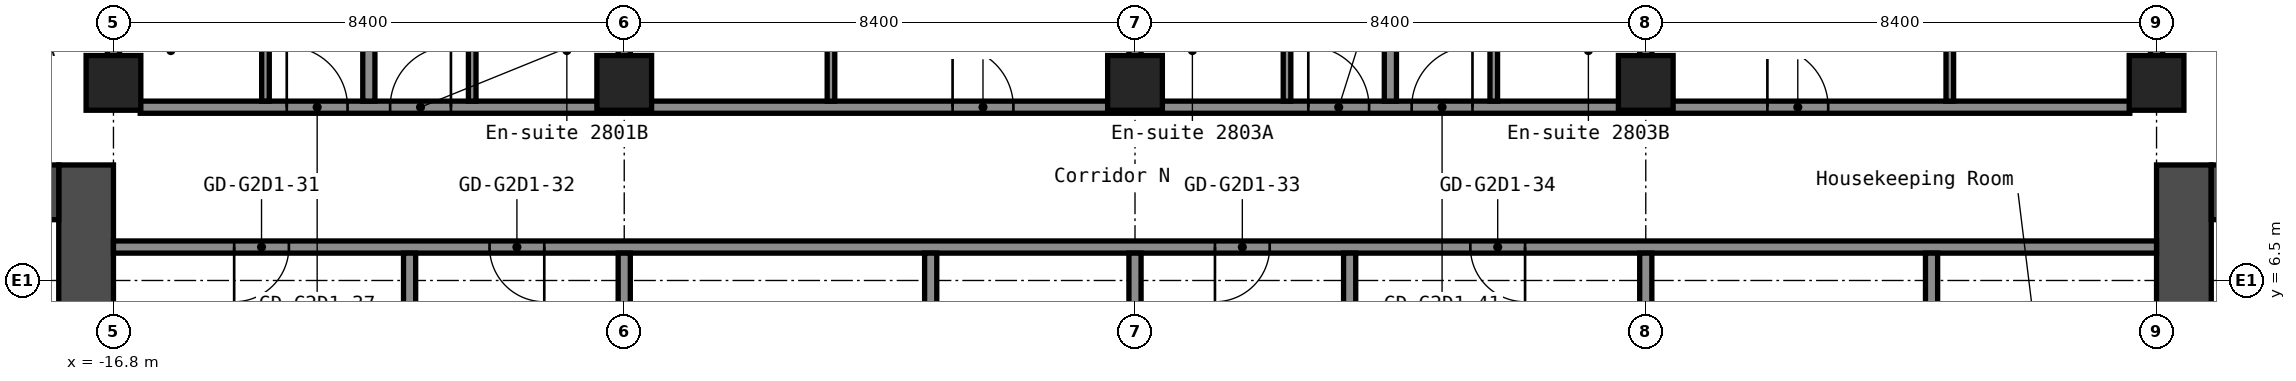
"""IFC4 building model, lengths in metres.
Left out: names, types, materials, properties, quantities, classifications, styles, units other than length and angle.
Written with IfcOpenShell. Run it as: python <this file> out.ifc"""

import sys

from ifc_helpers import new_model, si_unit, direction, frame, frame_2d, origin, origin_2d, place, context, subcontext, project, spatial, rectangle, hollow_rectangle, extrude, element, fill, save


model = new_model("IFC4")
c1 = context("Model", 3, precision=1e-05, world=origin(), true_north=direction((0.0, 1.0)))
c2 = subcontext(c1, "Body", "Model", "MODEL_VIEW")
j1 = project(units=[si_unit("LENGTHUNIT", "METRE"), si_unit("PLANEANGLEUNIT", "RADIAN")], contexts=[c1])
p1 = place(None, origin())
s1 = spatial("IfcSite", under=j1, at=p1, CompositionType="ELEMENT")
p2 = place(p1, origin())
s2 = spatial("IfcBuilding", under=s1, at=p2, CompositionType="ELEMENT")
p3 = place(p2, frame((0.0, 0.0, 101.0)))
s3 = spatial("IfcBuildingStorey", under=s2, at=p3, CompositionType="ELEMENT", Elevation=101.0)
for number, where, z_axis, x_axis in (
    (1, (-16.8, 9.75, 0.0), (0.0, 0.0, 1.0), (1.0, 0.0, 0.0)),
    (2, (-8.4, 9.75, 0.0), (0.0, 0.0, 1.0), (1.0, 0.0, 0.0)),
    (3, (0.0, 9.75, 0.0), (0.0, 0.0, 1.0), (1.0, 0.0, 0.0)),
    (4, (8.4, 9.75, 0.0), (0.0, 0.0, 1.0), (1.0, 0.0, 0.0)),
    (5, (16.8, 9.75, 0.0), (0.0, 0.0, 1.0), (1.0, 0.0, 0.0)),
):
    element("IfcColumn", number, at=place(p3, frame(where, z_axis=z_axis, x_axis=x_axis)), inside=s3, PredefinedType="COLUMN", context=c2, shape_type="SweptSolid", body=[
        extrude(hollow_rectangle(XDim=0.9, YDim=0.9, WallThickness=0.036, at=origin_2d()), origin(), (0.0, 0.0, 1.0), 2.8),
    ])
p4 = place(p3, frame((-17.25, -8.4, 0.0), z_axis=(0.0, 0.0, 1.0), x_axis=(0.0, 1.0, 0.0)))
e6 = element("IfcWall", 6, at=p4, inside=s3, PredefinedType="SHEAR", context=c2, shape_type="SweptSolid", body=[
    extrude(rectangle(XDim=16.8, YDim=0.9, at=frame_2d((8.4, 0.0))), origin(), (0.0, 0.0, 1.0), 2.8),
])
p5 = place(p4, frame((7.6, 0.0, 0.0)))
e7 = element("IfcOpeningElement", 7, at=p5, cuts=e6, PredefinedType="OPENING", context=c2, shape_type="SweptSolid", body=[
    extrude(rectangle(XDim=1.2, YDim=2.1, at=frame_2d((0.6, 1.05))), frame((0.0, 0.46, 0.0), z_axis=(0.0, -1.0, 0.0), x_axis=(1.0, 0.0, 0.0)), (0.0, 0.0, 1.0), 0.92),
])
p6 = place(p3, frame((-32.7, 7.95, 0.0), z_axis=(0.0, 0.0, 1.0), x_axis=(1.0, 0.0, 0.0)))
e8 = element("IfcWall", 8, at=p6, inside=s3, PredefinedType="SHEAR", context=c2, shape_type="SweptSolid", body=[
    extrude(rectangle(XDim=15.0, YDim=0.9, at=frame_2d((7.5, 0.0))), origin(), (0.0, 0.0, 1.0), 2.8),
])
p7 = place(p6, frame((3.4, 0.0, 0.0)))
e9 = element("IfcOpeningElement", 9, at=p7, cuts=e8, PredefinedType="OPENING", context=c2, shape_type="SweptSolid", body=[
    extrude(rectangle(XDim=1.2, YDim=2.1, at=frame_2d((0.6, 1.05))), frame((0.0, 0.46, 0.0), z_axis=(0.0, -1.0, 0.0), x_axis=(1.0, 0.0, 0.0)), (0.0, 0.0, 1.0), 0.92),
])
p8 = place(p6, frame((0.75, 0.0, 0.0)))
e10 = element("IfcOpeningElement", 10, at=p8, cuts=e8, PredefinedType="OPENING", context=c2, shape_type="SweptSolid", body=[
    extrude(rectangle(XDim=0.9, YDim=2.1, at=frame_2d((0.45, 1.05))), frame((0.0, 0.46, 0.0), z_axis=(0.0, -1.0, 0.0), x_axis=(1.0, 0.0, 0.0)), (0.0, 0.0, 1.0), 0.92),
])
p9 = place(p3, frame((17.25, -8.4, 0.0), z_axis=(0.0, 0.0, 1.0), x_axis=(0.0, 1.0, 0.0)))
e11 = element("IfcWall", 11, at=p9, inside=s3, PredefinedType="SHEAR", context=c2, shape_type="SweptSolid", body=[
    extrude(rectangle(XDim=16.8, YDim=0.9, at=frame_2d((8.4, 0.0))), origin(), (0.0, 0.0, 1.0), 2.8),
])
p10 = place(p9, frame((7.6, 0.0, 0.0)))
e12 = element("IfcOpeningElement", 12, at=p10, cuts=e11, PredefinedType="OPENING", context=c2, shape_type="SweptSolid", body=[
    extrude(rectangle(XDim=1.2, YDim=2.1, at=frame_2d((0.6, 1.05))), frame((0.0, 0.46, 0.0), z_axis=(0.0, -1.0, 0.0), x_axis=(1.0, 0.0, 0.0)), (0.0, 0.0, 1.0), 0.92),
])
p11 = place(p3, frame((17.7, 7.95, 0.0), z_axis=(0.0, 0.0, 1.0), x_axis=(1.0, 0.0, 0.0)))
e13 = element("IfcWall", 13, at=p11, inside=s3, PredefinedType="SHEAR", context=c2, shape_type="SweptSolid", body=[
    extrude(rectangle(XDim=15.0, YDim=0.9, at=frame_2d((7.5, 0.0))), origin(), (0.0, 0.0, 1.0), 2.8),
])
p12 = place(p11, frame((10.4, 0.0, 0.0)))
e14 = element("IfcOpeningElement", 14, at=p12, cuts=e13, PredefinedType="OPENING", context=c2, shape_type="SweptSolid", body=[
    extrude(rectangle(XDim=1.2, YDim=2.1, at=frame_2d((0.6, 1.05))), frame((0.0, 0.46, 0.0), z_axis=(0.0, -1.0, 0.0), x_axis=(1.0, 0.0, 0.0)), (0.0, 0.0, 1.0), 0.92),
])
p13 = place(p11, frame((13.35, 0.0, 0.0)))
e15 = element("IfcOpeningElement", 15, at=p13, cuts=e13, PredefinedType="OPENING", context=c2, shape_type="SweptSolid", body=[
    extrude(rectangle(XDim=0.9, YDim=2.1, at=frame_2d((0.45, 1.05))), frame((0.0, 0.46, 0.0), z_axis=(0.0, -1.0, 0.0), x_axis=(1.0, 0.0, 0.0)), (0.0, 0.0, 1.0), 0.92),
])
p14 = place(p3, frame((-16.8, 7.05, 0.0), z_axis=(0.0, 0.0, 1.0), x_axis=(1.0, 0.0, 0.0)))
e16 = element("IfcWall", 16, at=p14, inside=s3, PredefinedType="PARTITIONING", context=c2, shape_type="SweptSolid", body=[
    extrude(rectangle(XDim=33.6, YDim=0.2, at=frame_2d((16.8, 0.0))), origin(), (0.0, 0.0, 1.0), 2.8),
])
p15 = place(p14, frame((1.985, 0.0, 0.0)))
e17 = element("IfcOpeningElement", 17, at=p15, cuts=e16, PredefinedType="OPENING", context=c2, shape_type="SweptSolid", body=[
    extrude(rectangle(XDim=0.9, YDim=2.1, at=frame_2d((0.45, 1.05))), frame((0.0, 0.11, 0.0), z_axis=(0.0, -1.0, 0.0), x_axis=(1.0, 0.0, 0.0)), (0.0, 0.0, 1.0), 0.22),
])
p16 = place(p14, frame((6.185, 0.0, 0.0)))
e18 = element("IfcOpeningElement", 18, at=p16, cuts=e16, PredefinedType="OPENING", context=c2, shape_type="SweptSolid", body=[
    extrude(rectangle(XDim=0.9, YDim=2.1, at=frame_2d((0.45, 1.05))), frame((0.0, 0.11, 0.0), z_axis=(0.0, -1.0, 0.0), x_axis=(1.0, 0.0, 0.0)), (0.0, 0.0, 1.0), 0.22),
])
p17 = place(p14, frame((18.115, 0.0, 0.0)))
e19 = element("IfcOpeningElement", 19, at=p17, cuts=e16, PredefinedType="OPENING", context=c2, shape_type="SweptSolid", body=[
    extrude(rectangle(XDim=0.9, YDim=2.1, at=frame_2d((0.45, 1.05))), frame((0.0, 0.11, 0.0), z_axis=(0.0, -1.0, 0.0), x_axis=(1.0, 0.0, 0.0)), (0.0, 0.0, 1.0), 0.22),
])
p18 = place(p14, frame((22.315, 0.0, 0.0)))
e20 = element("IfcOpeningElement", 20, at=p18, cuts=e16, PredefinedType="OPENING", context=c2, shape_type="SweptSolid", body=[
    extrude(rectangle(XDim=0.9, YDim=2.1, at=frame_2d((0.45, 1.05))), frame((0.0, 0.11, 0.0), z_axis=(0.0, -1.0, 0.0), x_axis=(1.0, 0.0, 0.0)), (0.0, 0.0, 1.0), 0.22),
])
p19 = place(p3, frame((-16.36, 9.35, 0.0), z_axis=(0.0, 0.0, 1.0), x_axis=(1.0, 0.0, 0.0)))
e21 = element("IfcWall", 21, at=p19, inside=s3, PredefinedType="PARTITIONING", context=c2, shape_type="SweptSolid", body=[
    extrude(rectangle(XDim=32.72, YDim=0.2, at=frame_2d((16.36, 0.0))), origin(), (0.0, 0.0, 1.0), 2.8),
])
p20 = place(p19, frame((2.41, 0.0, 0.0)))
e22 = element("IfcOpeningElement", 22, at=p20, cuts=e21, PredefinedType="OPENING", context=c2, shape_type="SweptSolid", body=[
    extrude(rectangle(XDim=1.0, YDim=2.1, at=frame_2d((0.5, 1.05))), frame((0.0, 0.11, 0.0), z_axis=(0.0, -1.0, 0.0), x_axis=(1.0, 0.0, 0.0)), (0.0, 0.0, 1.0), 0.22),
])
p21 = place(p19, frame((4.11, 0.0, 0.0)))
e23 = element("IfcOpeningElement", 23, at=p21, cuts=e21, PredefinedType="OPENING", context=c2, shape_type="SweptSolid", body=[
    extrude(rectangle(XDim=1.0, YDim=2.1, at=frame_2d((0.5, 1.05))), frame((0.0, 0.11, 0.0), z_axis=(0.0, -1.0, 0.0), x_axis=(1.0, 0.0, 0.0)), (0.0, 0.0, 1.0), 0.22),
])
p22 = place(p19, frame((13.36, 0.0, 0.0)))
e24 = element("IfcOpeningElement", 24, at=p22, cuts=e21, PredefinedType="OPENING", context=c2, shape_type="SweptSolid", body=[
    extrude(rectangle(XDim=1.0, YDim=2.1, at=frame_2d((0.5, 1.05))), frame((0.0, 0.11, 0.0), z_axis=(0.0, -1.0, 0.0), x_axis=(1.0, 0.0, 0.0)), (0.0, 0.0, 1.0), 0.22),
])
p23 = place(p19, frame((19.21, 0.0, 0.0)))
e25 = element("IfcOpeningElement", 25, at=p23, cuts=e21, PredefinedType="OPENING", context=c2, shape_type="SweptSolid", body=[
    extrude(rectangle(XDim=1.0, YDim=2.1, at=frame_2d((0.5, 1.05))), frame((0.0, 0.11, 0.0), z_axis=(0.0, -1.0, 0.0), x_axis=(1.0, 0.0, 0.0)), (0.0, 0.0, 1.0), 0.22),
])
p24 = place(p19, frame((20.91, 0.0, 0.0)))
e26 = element("IfcOpeningElement", 26, at=p24, cuts=e21, PredefinedType="OPENING", context=c2, shape_type="SweptSolid", body=[
    extrude(rectangle(XDim=1.0, YDim=2.1, at=frame_2d((0.5, 1.05))), frame((0.0, 0.11, 0.0), z_axis=(0.0, -1.0, 0.0), x_axis=(1.0, 0.0, 0.0)), (0.0, 0.0, 1.0), 0.22),
])
p25 = place(p19, frame((26.76, 0.0, 0.0)))
e27 = element("IfcOpeningElement", 27, at=p25, cuts=e21, PredefinedType="OPENING", context=c2, shape_type="SweptSolid", body=[
    extrude(rectangle(XDim=1.0, YDim=2.1, at=frame_2d((0.5, 1.05))), frame((0.0, 0.11, 0.0), z_axis=(0.0, -1.0, 0.0), x_axis=(1.0, 0.0, 0.0)), (0.0, 0.0, 1.0), 0.22),
])
p26 = place(p3, frame((-16.8, 10.19, 0.0), z_axis=(0.0, 0.0, 1.0), x_axis=(0.0, 1.0, 0.0)))
e28 = element("IfcWall", 28, at=p26, inside=s3, PredefinedType="PARTITIONING", context=c2, shape_type="SweptSolid", body=[
    extrude(rectangle(XDim=13.36, YDim=0.2, at=frame_2d((6.68, 0.0))), origin(), (0.0, 0.0, 1.0), 2.8),
])
p27 = place(p3, frame((-14.3, 9.45, 0.0), z_axis=(0.0, 0.0, 1.0), x_axis=(0.0, 1.0, 0.0)))
e29 = element("IfcWall", 29, at=p27, inside=s3, PredefinedType="PARTITIONING", context=c2, shape_type="SweptSolid", body=[
    extrude(rectangle(XDim=2.9, YDim=0.125, at=frame_2d((1.45, 0.0))), origin(), (0.0, 0.0, 1.0), 2.8),
])
p28 = place(p27, frame((1.5, 0.0, 0.0)))
e30 = element("IfcOpeningElement", 30, at=p28, cuts=e29, PredefinedType="OPENING", context=c2, shape_type="SweptSolid", body=[
    extrude(rectangle(XDim=0.8, YDim=2.1, at=frame_2d((0.4, 1.05))), frame((0.0, 0.073, 0.0), z_axis=(0.0, -1.0, 0.0), x_axis=(1.0, 0.0, 0.0)), (0.0, 0.0, 1.0), 0.145),
])
p29 = place(p3, frame((-12.6, 9.45, 0.0), z_axis=(0.0, 0.0, 1.0), x_axis=(0.0, 1.0, 0.0)))
e31 = element("IfcWall", 31, at=p29, inside=s3, PredefinedType="PARTITIONING", context=c2, shape_type="SweptSolid", body=[
    extrude(rectangle(XDim=14.1, YDim=0.2, at=frame_2d((7.05, 0.0))), origin(), (0.0, 0.0, 1.0), 2.8),
])
p30 = place(p3, frame((-11.93, 1.05, 0.0), z_axis=(0.0, 0.0, 1.0), x_axis=(0.0, 1.0, 0.0)))
e32 = element("IfcWall", 32, at=p30, inside=s3, PredefinedType="PARTITIONING", context=c2, shape_type="SweptSolid", body=[
    extrude(rectangle(XDim=5.9, YDim=0.2, at=frame_2d((2.95, 0.0))), origin(), (0.0, 0.0, 1.0), 2.8),
])
p31 = place(p3, frame((-10.9, 9.45, 0.0), z_axis=(0.0, 0.0, 1.0), x_axis=(0.0, 1.0, 0.0)))
e33 = element("IfcWall", 33, at=p31, inside=s3, PredefinedType="PARTITIONING", context=c2, shape_type="SweptSolid", body=[
    extrude(rectangle(XDim=2.9, YDim=0.125, at=frame_2d((1.45, 0.0))), origin(), (0.0, 0.0, 1.0), 2.8),
])
p32 = place(p31, frame((1.5, 0.0, 0.0)))
e34 = element("IfcOpeningElement", 34, at=p32, cuts=e33, PredefinedType="OPENING", context=c2, shape_type="SweptSolid", body=[
    extrude(rectangle(XDim=0.8, YDim=2.1, at=frame_2d((0.4, 1.05))), frame((0.0, 0.073, 0.0), z_axis=(0.0, -1.0, 0.0), x_axis=(1.0, 0.0, 0.0)), (0.0, 0.0, 1.0), 0.145),
])
p33 = place(p3, frame((-8.4, 1.05, 0.0), z_axis=(0.0, 0.0, 1.0), x_axis=(0.0, 1.0, 0.0)))
e35 = element("IfcWall", 35, at=p33, inside=s3, PredefinedType="PARTITIONING", context=c2, shape_type="SweptSolid", body=[
    extrude(rectangle(XDim=5.9, YDim=0.2, at=frame_2d((2.95, 0.0))), origin(), (0.0, 0.0, 1.0), 2.8),
])
p34 = place(p3, frame((-8.4, 10.19, 0.0), z_axis=(0.0, 0.0, 1.0), x_axis=(0.0, 1.0, 0.0)))
e36 = element("IfcWall", 36, at=p34, inside=s3, PredefinedType="PARTITIONING", context=c2, shape_type="SweptSolid", body=[
    extrude(rectangle(XDim=13.36, YDim=0.2, at=frame_2d((6.68, 0.0))), origin(), (0.0, 0.0, 1.0), 2.8),
])
p35 = place(p3, frame((-5.0, 9.45, 0.0), z_axis=(0.0, 0.0, 1.0), x_axis=(0.0, 1.0, 0.0)))
e37 = element("IfcWall", 37, at=p35, inside=s3, PredefinedType="PARTITIONING", context=c2, shape_type="SweptSolid", body=[
    extrude(rectangle(XDim=3.3, YDim=0.125, at=frame_2d((1.65, 0.0))), origin(), (0.0, 0.0, 1.0), 2.8),
])
for number, where, z_axis, x_axis in (
    (38, (-3.36, 1.05, 0.0), (0.0, 0.0, 1.0), (0.0, 1.0, 0.0)),
    (39, (0.0, 1.05, 0.0), (0.0, 0.0, 1.0), (0.0, 1.0, 0.0)),
):
    element("IfcWall", number, at=place(p3, frame(where, z_axis=z_axis, x_axis=x_axis)), inside=s3, PredefinedType="PARTITIONING", context=c2, shape_type="SweptSolid", body=[
        extrude(rectangle(XDim=5.9, YDim=0.2, at=frame_2d((2.95, 0.0))), origin(), (0.0, 0.0, 1.0), 2.8),
    ])
p36 = place(p3, frame((0.0, 10.19, 0.0), z_axis=(0.0, 0.0, 1.0), x_axis=(0.0, 1.0, 0.0)))
e40 = element("IfcWall", 40, at=p36, inside=s3, PredefinedType="PARTITIONING", context=c2, shape_type="SweptSolid", body=[
    extrude(rectangle(XDim=13.36, YDim=0.2, at=frame_2d((6.68, 0.0))), origin(), (0.0, 0.0, 1.0), 2.8),
])
p37 = place(p3, frame((2.5, 9.45, 0.0), z_axis=(0.0, 0.0, 1.0), x_axis=(0.0, 1.0, 0.0)))
e41 = element("IfcWall", 41, at=p37, inside=s3, PredefinedType="PARTITIONING", context=c2, shape_type="SweptSolid", body=[
    extrude(rectangle(XDim=2.9, YDim=0.125, at=frame_2d((1.45, 0.0))), origin(), (0.0, 0.0, 1.0), 2.8),
])
p38 = place(p37, frame((1.5, 0.0, 0.0)))
e42 = element("IfcOpeningElement", 42, at=p38, cuts=e41, PredefinedType="OPENING", context=c2, shape_type="SweptSolid", body=[
    extrude(rectangle(XDim=0.8, YDim=2.1, at=frame_2d((0.4, 1.05))), frame((0.0, 0.073, 0.0), z_axis=(0.0, -1.0, 0.0), x_axis=(1.0, 0.0, 0.0)), (0.0, 0.0, 1.0), 0.145),
])
p39 = place(p3, frame((3.53, 1.05, 0.0), z_axis=(0.0, 0.0, 1.0), x_axis=(0.0, 1.0, 0.0)))
e43 = element("IfcWall", 43, at=p39, inside=s3, PredefinedType="PARTITIONING", context=c2, shape_type="SweptSolid", body=[
    extrude(rectangle(XDim=5.9, YDim=0.2, at=frame_2d((2.95, 0.0))), origin(), (0.0, 0.0, 1.0), 2.8),
])
p40 = place(p3, frame((4.2, 9.45, 0.0), z_axis=(0.0, 0.0, 1.0), x_axis=(0.0, 1.0, 0.0)))
e44 = element("IfcWall", 44, at=p40, inside=s3, PredefinedType="PARTITIONING", context=c2, shape_type="SweptSolid", body=[
    extrude(rectangle(XDim=14.1, YDim=0.2, at=frame_2d((7.05, 0.0))), origin(), (0.0, 0.0, 1.0), 2.8),
])
p41 = place(p3, frame((5.9, 9.45, 0.0), z_axis=(0.0, 0.0, 1.0), x_axis=(0.0, 1.0, 0.0)))
e45 = element("IfcWall", 45, at=p41, inside=s3, PredefinedType="PARTITIONING", context=c2, shape_type="SweptSolid", body=[
    extrude(rectangle(XDim=2.9, YDim=0.125, at=frame_2d((1.45, 0.0))), origin(), (0.0, 0.0, 1.0), 2.8),
])
p42 = place(p41, frame((1.5, 0.0, 0.0)))
e46 = element("IfcOpeningElement", 46, at=p42, cuts=e45, PredefinedType="OPENING", context=c2, shape_type="SweptSolid", body=[
    extrude(rectangle(XDim=0.8, YDim=2.1, at=frame_2d((0.4, 1.05))), frame((0.0, 0.073, 0.0), z_axis=(0.0, -1.0, 0.0), x_axis=(1.0, 0.0, 0.0)), (0.0, 0.0, 1.0), 0.145),
])
p43 = place(p3, frame((8.4, 1.05, 0.0), z_axis=(0.0, 0.0, 1.0), x_axis=(0.0, 1.0, 0.0)))
e47 = element("IfcWall", 47, at=p43, inside=s3, PredefinedType="PARTITIONING", context=c2, shape_type="SweptSolid", body=[
    extrude(rectangle(XDim=5.9, YDim=0.2, at=frame_2d((2.95, 0.0))), origin(), (0.0, 0.0, 1.0), 2.8),
])
p44 = place(p3, frame((8.4, 10.19, 0.0), z_axis=(0.0, 0.0, 1.0), x_axis=(0.0, 1.0, 0.0)))
e48 = element("IfcWall", 48, at=p44, inside=s3, PredefinedType="PARTITIONING", context=c2, shape_type="SweptSolid", body=[
    extrude(rectangle(XDim=13.36, YDim=0.2, at=frame_2d((6.68, 0.0))), origin(), (0.0, 0.0, 1.0), 2.8),
])
p45 = place(p3, frame((13.1, 1.05, 0.0), z_axis=(0.0, 0.0, 1.0), x_axis=(0.0, 1.0, 0.0)))
e49 = element("IfcWall", 49, at=p45, inside=s3, PredefinedType="PARTITIONING", context=c2, shape_type="SweptSolid", body=[
    extrude(rectangle(XDim=5.9, YDim=0.2, at=frame_2d((2.95, 0.0))), origin(), (0.0, 0.0, 1.0), 2.8),
])
p46 = place(p3, frame((13.4, 9.45, 0.0), z_axis=(0.0, 0.0, 1.0), x_axis=(0.0, 1.0, 0.0)))
e50 = element("IfcWall", 50, at=p46, inside=s3, PredefinedType="PARTITIONING", context=c2, shape_type="SweptSolid", body=[
    extrude(rectangle(XDim=3.3, YDim=0.125, at=frame_2d((1.65, 0.0))), origin(), (0.0, 0.0, 1.0), 2.8),
])
p47 = place(p3, frame((16.8, 10.19, 0.0), z_axis=(0.0, 0.0, 1.0), x_axis=(0.0, 1.0, 0.0)))
e51 = element("IfcWall", 51, at=p47, inside=s3, PredefinedType="PARTITIONING", context=c2, shape_type="SweptSolid", body=[
    extrude(rectangle(XDim=13.36, YDim=0.2, at=frame_2d((6.68, 0.0))), origin(), (0.0, 0.0, 1.0), 2.8),
])
p48 = place(p15, origin())
e52 = element("IfcDoor", 52, at=p48, inside=s3, OperationType="SINGLE_SWING_LEFT", PredefinedType="DOOR", context=c2, shape_type="SweptSolid", body=[
    extrude(rectangle(XDim=0.9, YDim=2.1, at=frame_2d((0.45, 1.05))), frame((0.0, 0.025, 0.0), z_axis=(0.0, -1.0, 0.0), x_axis=(1.0, 0.0, 0.0)), (0.0, 0.0, 1.0), 0.05),
])
fill(e17, e52)
p49 = place(p16, origin())
e53 = element("IfcDoor", 53, at=p49, inside=s3, OperationType="SINGLE_SWING_RIGHT", PredefinedType="DOOR", context=c2, shape_type="SweptSolid", body=[
    extrude(rectangle(XDim=0.9, YDim=2.1, at=frame_2d((0.45, 1.05))), frame((0.0, 0.025, 0.0), z_axis=(0.0, -1.0, 0.0), x_axis=(1.0, 0.0, 0.0)), (0.0, 0.0, 1.0), 0.05),
])
fill(e18, e53)
p50 = place(p17, origin())
e54 = element("IfcDoor", 54, at=p50, inside=s3, OperationType="SINGLE_SWING_LEFT", PredefinedType="DOOR", context=c2, shape_type="SweptSolid", body=[
    extrude(rectangle(XDim=0.9, YDim=2.1, at=frame_2d((0.45, 1.05))), frame((0.0, 0.025, 0.0), z_axis=(0.0, -1.0, 0.0), x_axis=(1.0, 0.0, 0.0)), (0.0, 0.0, 1.0), 0.05),
])
fill(e19, e54)
p51 = place(p18, origin())
e55 = element("IfcDoor", 55, at=p51, inside=s3, OperationType="SINGLE_SWING_RIGHT", PredefinedType="DOOR", context=c2, shape_type="SweptSolid", body=[
    extrude(rectangle(XDim=0.9, YDim=2.1, at=frame_2d((0.45, 1.05))), frame((0.0, 0.025, 0.0), z_axis=(0.0, -1.0, 0.0), x_axis=(1.0, 0.0, 0.0)), (0.0, 0.0, 1.0), 0.05),
])
fill(e20, e55)
p52 = place(p20, origin())
e56 = element("IfcDoor", 56, at=p52, inside=s3, OperationType="SINGLE_SWING_RIGHT", PredefinedType="DOOR", context=c2, shape_type="SweptSolid", body=[
    extrude(rectangle(XDim=1.0, YDim=2.1, at=frame_2d((0.5, 1.05))), frame((0.0, 0.025, 0.0), z_axis=(0.0, -1.0, 0.0), x_axis=(1.0, 0.0, 0.0)), (0.0, 0.0, 1.0), 0.05),
])
fill(e22, e56)
p53 = place(p21, origin())
e57 = element("IfcDoor", 57, at=p53, inside=s3, OperationType="SINGLE_SWING_LEFT", PredefinedType="DOOR", context=c2, shape_type="SweptSolid", body=[
    extrude(rectangle(XDim=1.0, YDim=2.1, at=frame_2d((0.5, 1.05))), frame((0.0, 0.025, 0.0), z_axis=(0.0, -1.0, 0.0), x_axis=(1.0, 0.0, 0.0)), (0.0, 0.0, 1.0), 0.05),
])
fill(e23, e57)
p54 = place(p22, origin())
e58 = element("IfcDoor", 58, at=p54, inside=s3, OperationType="SINGLE_SWING_RIGHT", PredefinedType="DOOR", context=c2, shape_type="SweptSolid", body=[
    extrude(rectangle(XDim=1.0, YDim=2.1, at=frame_2d((0.5, 1.05))), frame((0.0, 0.025, 0.0), z_axis=(0.0, -1.0, 0.0), x_axis=(1.0, 0.0, 0.0)), (0.0, 0.0, 1.0), 0.05),
])
fill(e24, e58)
p55 = place(p23, origin())
e59 = element("IfcDoor", 59, at=p55, inside=s3, OperationType="SINGLE_SWING_RIGHT", PredefinedType="DOOR", context=c2, shape_type="SweptSolid", body=[
    extrude(rectangle(XDim=1.0, YDim=2.1, at=frame_2d((0.5, 1.05))), frame((0.0, 0.025, 0.0), z_axis=(0.0, -1.0, 0.0), x_axis=(1.0, 0.0, 0.0)), (0.0, 0.0, 1.0), 0.05),
])
fill(e25, e59)
p56 = place(p24, origin())
e60 = element("IfcDoor", 60, at=p56, inside=s3, OperationType="SINGLE_SWING_LEFT", PredefinedType="DOOR", context=c2, shape_type="SweptSolid", body=[
    extrude(rectangle(XDim=1.0, YDim=2.1, at=frame_2d((0.5, 1.05))), frame((0.0, 0.025, 0.0), z_axis=(0.0, -1.0, 0.0), x_axis=(1.0, 0.0, 0.0)), (0.0, 0.0, 1.0), 0.05),
])
fill(e26, e60)
p57 = place(p25, origin())
e61 = element("IfcDoor", 61, at=p57, inside=s3, OperationType="SINGLE_SWING_RIGHT", PredefinedType="DOOR", context=c2, shape_type="SweptSolid", body=[
    extrude(rectangle(XDim=1.0, YDim=2.1, at=frame_2d((0.5, 1.05))), frame((0.0, 0.025, 0.0), z_axis=(0.0, -1.0, 0.0), x_axis=(1.0, 0.0, 0.0)), (0.0, 0.0, 1.0), 0.05),
])
fill(e27, e61)
save(model, sys.argv[1])
